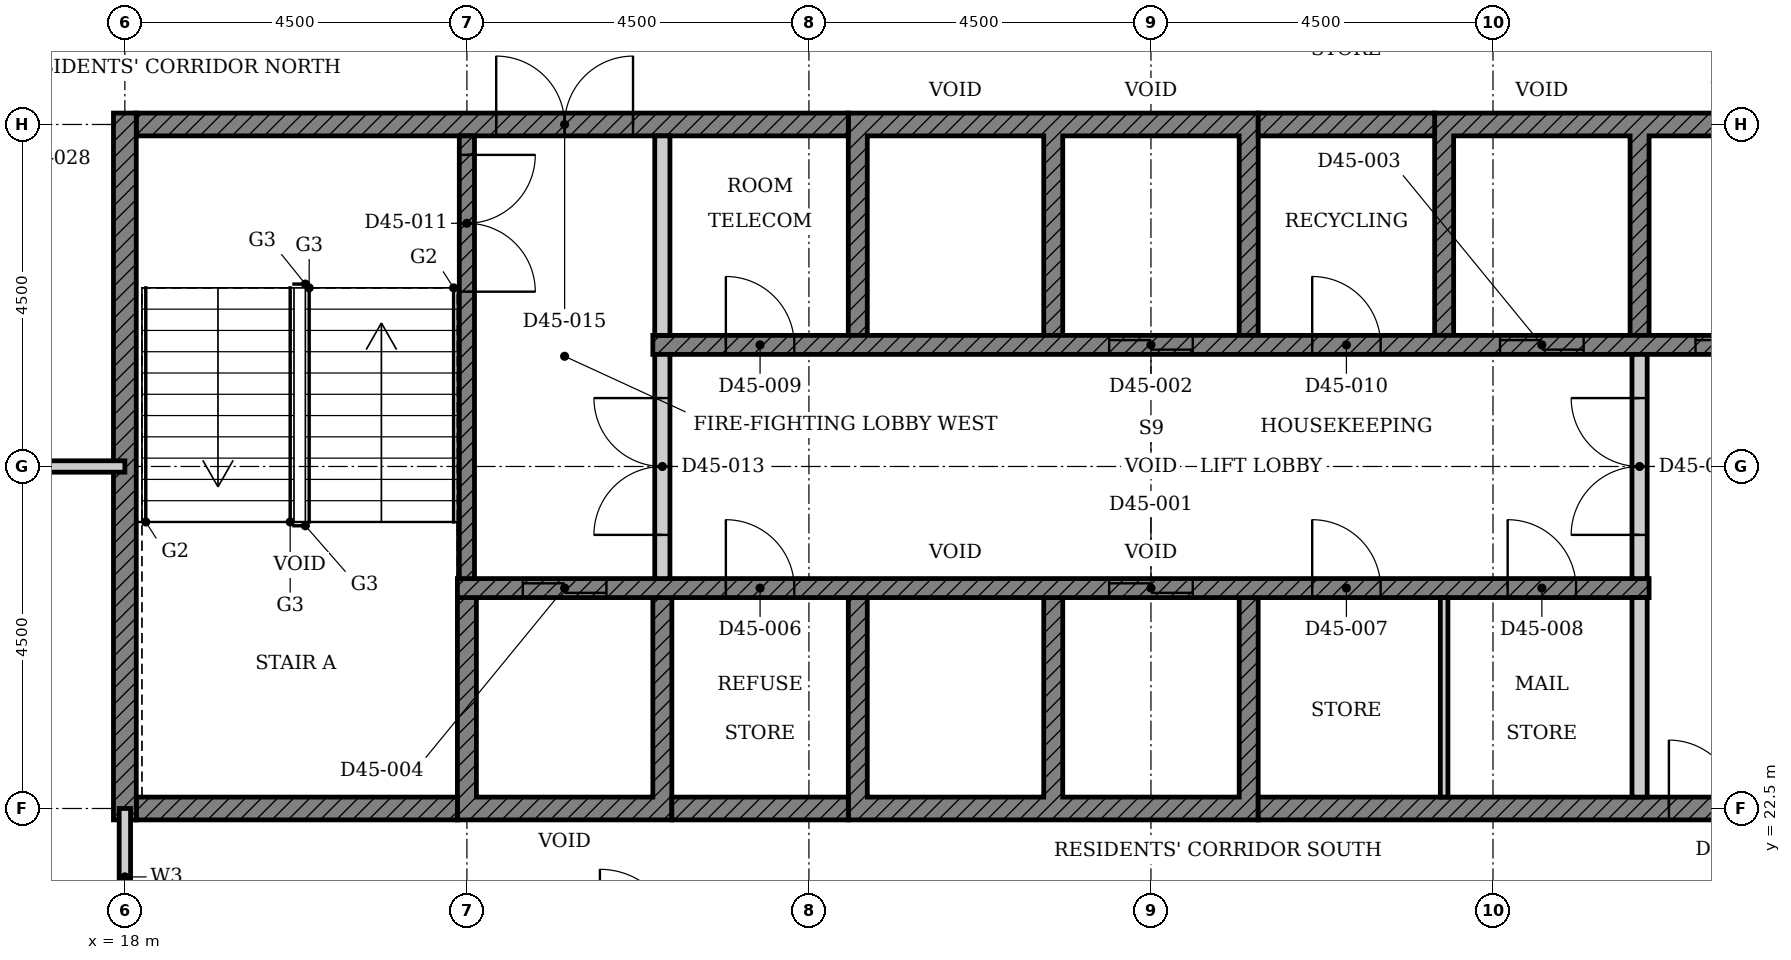
"""IFC4 building model, lengths in metres.
Left out: names, types, materials, properties, quantities, classifications, styles, units other than length and angle.
Written with IfcOpenShell. Run it as: python <this file> out.ifc"""

import sys

from ifc_helpers import new_model, si_unit, direction, frame, frame_2d, origin, place, context, subcontext, project, spatial, polyline, rectangle, outline, extrude, element, fill, save


model = new_model("IFC4")
c1 = context("Model", 3, precision=1e-05, world=origin(), true_north=direction((0.0, 1.0)))
c2 = subcontext(c1, "Body", "Model", "MODEL_VIEW")
j1 = project(units=[si_unit("LENGTHUNIT", "METRE"), si_unit("PLANEANGLEUNIT", "RADIAN")], contexts=[c1])
p1 = place(None, origin())
s1 = spatial("IfcSite", under=j1, at=p1, CompositionType="ELEMENT")
p2 = place(p1, origin())
s2 = spatial("IfcBuilding", under=s1, at=p2, CompositionType="ELEMENT")
p3 = place(p2, frame((0.0, 0.0, 180.2)))
s3 = spatial("IfcBuildingStorey", under=s2, at=p3, CompositionType="ELEMENT", Elevation=180.2)
p4 = place(p3, origin())
e1 = element("IfcWall", 1, at=p4, inside=s3, PredefinedType="SHEAR", context=c2, shape_type="SweptSolid", body=[
    extrude(outline(polyline([(22.375, 22.35), (25.197, 22.35), (25.197, 25.275), (24.947, 25.275), (24.947, 22.65), (22.625, 22.65), (22.625, 25.275), (22.375, 25.275), (22.375, 22.35)])), origin(), (0.0, 0.0, 1.0), 3.4),
])
p5 = place(p3, origin())
e2 = element("IfcWall", 2, at=p5, inside=s3, PredefinedType="SHEAR", context=c2, shape_type="SweptSolid", body=[
    extrude(outline(polyline([(27.518, 22.35), (32.911, 22.35), (32.911, 25.275), (32.661, 25.275), (32.661, 22.65), (30.339, 22.65), (30.339, 25.275), (30.089, 25.275), (30.089, 22.65), (27.768, 22.65), (27.768, 25.275), (27.518, 25.275), (27.518, 22.35)])), origin(), (0.0, 0.0, 1.0), 3.4),
])
p6 = place(p3, origin())
e3 = element("IfcWall", 3, at=p6, inside=s3, PredefinedType="SHEAR", context=c2, shape_type="SweptSolid", body=[
    extrude(outline(polyline([(27.518, 28.725), (27.768, 28.725), (27.768, 31.35), (30.089, 31.35), (30.089, 28.725), (30.339, 28.725), (30.339, 31.35), (32.661, 31.35), (32.661, 28.725), (32.911, 28.725), (32.911, 31.65), (27.518, 31.65), (27.518, 28.725)])), origin(), (0.0, 0.0, 1.0), 3.4),
])
p7 = place(p3, origin())
e4 = element("IfcWall", 4, at=p7, inside=s3, PredefinedType="SHEAR", context=c2, shape_type="SweptSolid", body=[
    extrude(outline(polyline([(35.232, 28.725), (35.482, 28.725), (35.482, 31.35), (37.803, 31.35), (37.803, 28.725), (38.053, 28.725), (38.053, 31.35), (40.375, 31.35), (40.375, 28.725), (40.625, 28.725), (40.625, 31.65), (35.232, 31.65), (35.232, 28.725)])), origin(), (0.0, 0.0, 1.0), 3.4),
])
p8 = place(p3, frame((18.15, 22.5, 0.0), z_axis=(0.0, 0.0, 1.0), x_axis=(1.0, 0.0, 0.0)))
e5 = element("IfcWall", 5, at=p8, inside=s3, PredefinedType="SHEAR", context=c2, shape_type="SweptSolid", body=[
    extrude(rectangle(XDim=4.225, YDim=0.3, at=frame_2d((2.113, 0.0))), origin(), (0.0, 0.0, 1.0), 3.4),
])
p9 = place(p3, frame((25.197, 22.5, 0.0), z_axis=(0.0, 0.0, 1.0), x_axis=(1.0, 0.0, 0.0)))
e6 = element("IfcWall", 6, at=p9, inside=s3, PredefinedType="SHEAR", context=c2, shape_type="SweptSolid", body=[
    extrude(rectangle(XDim=2.321, YDim=0.3, at=frame_2d((1.161, 0.0))), origin(), (0.0, 0.0, 1.0), 3.4),
])
p10 = place(p3, frame((32.911, 22.5, 0.0), z_axis=(0.0, 0.0, 1.0), x_axis=(1.0, 0.0, 0.0)))
e7 = element("IfcWall", 7, at=p10, inside=s3, PredefinedType="SHEAR", context=c2, shape_type="SweptSolid", body=[
    extrude(rectangle(XDim=11.939, YDim=0.3, at=frame_2d((5.97, 0.0))), origin(), (0.0, 0.0, 1.0), 3.4),
])
p11 = place(p10, frame((5.404, 0.0, 0.0)))
e8 = element("IfcOpeningElement", 8, at=p11, cuts=e7, PredefinedType="OPENING", context=c2, shape_type="SweptSolid", body=[
    extrude(rectangle(XDim=1.8, YDim=2.1, at=frame_2d((0.9, 1.05))), frame((0.0, 0.16, 0.0), z_axis=(0.0, -1.0, 0.0), x_axis=(1.0, 0.0, 0.0)), (0.0, 0.0, 1.0), 0.32),
])
p12 = place(p3, frame((18.15, 31.5, 0.0), z_axis=(0.0, 0.0, 1.0), x_axis=(1.0, 0.0, 0.0)))
e9 = element("IfcWall", 9, at=p12, inside=s3, PredefinedType="SHEAR", context=c2, shape_type="SweptSolid", body=[
    extrude(rectangle(XDim=9.368, YDim=0.3, at=frame_2d((4.684, 0.0))), origin(), (0.0, 0.0, 1.0), 3.4),
])
p13 = place(p12, frame((4.736, 0.0, 0.0)))
e10 = element("IfcOpeningElement", 10, at=p13, cuts=e9, PredefinedType="OPENING", context=c2, shape_type="SweptSolid", body=[
    extrude(rectangle(XDim=1.8, YDim=2.1, at=frame_2d((0.9, 1.05))), frame((0.0, 0.16, 0.0), z_axis=(0.0, -1.0, 0.0), x_axis=(1.0, 0.0, 0.0)), (0.0, 0.0, 1.0), 0.32),
])
p14 = place(p3, frame((32.911, 31.5, 0.0), z_axis=(0.0, 0.0, 1.0), x_axis=(1.0, 0.0, 0.0)))
e11 = element("IfcWall", 11, at=p14, inside=s3, PredefinedType="SHEAR", context=c2, shape_type="SweptSolid", body=[
    extrude(rectangle(XDim=2.322, YDim=0.3, at=frame_2d((1.161, 0.0))), origin(), (0.0, 0.0, 1.0), 3.4),
])
p15 = place(p3, frame((18.0, 22.35, 0.0), z_axis=(0.0, 0.0, 1.0), x_axis=(0.0, 1.0, 0.0)))
e12 = element("IfcWall", 12, at=p15, inside=s3, PredefinedType="SHEAR", context=c2, shape_type="SweptSolid", body=[
    extrude(rectangle(XDim=9.3, YDim=0.3, at=frame_2d((4.65, 0.0))), origin(), (0.0, 0.0, 1.0), 3.4),
])
p16 = place(p3, frame((22.375, 25.4, 0.0), z_axis=(0.0, 0.0, 1.0), x_axis=(1.0, 0.0, 0.0)))
e13 = element("IfcWall", 13, at=p16, inside=s3, PredefinedType="SHEAR", context=c2, shape_type="SweptSolid", body=[
    extrude(rectangle(XDim=15.678, YDim=0.25, at=frame_2d((7.839, 0.0))), origin(), (0.0, 0.0, 1.0), 3.4),
])
p17 = place(p16, frame((8.575, 0.0, 0.0)))
e14 = element("IfcOpeningElement", 14, at=p17, cuts=e13, PredefinedType="OPENING", context=c2, shape_type="SweptSolid", body=[
    extrude(rectangle(XDim=1.1, YDim=2.1, at=frame_2d((0.55, 1.05))), frame((0.0, 0.135, 0.0), z_axis=(0.0, -1.0, 0.0), x_axis=(1.0, 0.0, 0.0)), (0.0, 0.0, 1.0), 0.27),
])
p18 = place(p16, frame((0.861, 0.0, 0.0)))
e15 = element("IfcOpeningElement", 15, at=p18, cuts=e13, PredefinedType="OPENING", context=c2, shape_type="SweptSolid", body=[
    extrude(rectangle(XDim=1.1, YDim=2.1, at=frame_2d((0.55, 1.05))), frame((0.0, 0.135, 0.0), z_axis=(0.0, -1.0, 0.0), x_axis=(1.0, 0.0, 0.0)), (0.0, 0.0, 1.0), 0.27),
])
p19 = place(p16, frame((3.532, 0.0, 0.0)))
e16 = element("IfcOpeningElement", 16, at=p19, cuts=e13, PredefinedType="OPENING", context=c2, shape_type="SweptSolid", body=[
    extrude(rectangle(XDim=0.9, YDim=2.1, at=frame_2d((0.45, 1.05))), frame((0.0, 0.135, 0.0), z_axis=(0.0, -1.0, 0.0), x_axis=(1.0, 0.0, 0.0)), (0.0, 0.0, 1.0), 0.27),
])
p20 = place(p16, frame((11.246, 0.0, 0.0)))
e17 = element("IfcOpeningElement", 17, at=p20, cuts=e13, PredefinedType="OPENING", context=c2, shape_type="SweptSolid", body=[
    extrude(rectangle(XDim=0.9, YDim=2.1, at=frame_2d((0.45, 1.05))), frame((0.0, 0.135, 0.0), z_axis=(0.0, -1.0, 0.0), x_axis=(1.0, 0.0, 0.0)), (0.0, 0.0, 1.0), 0.27),
])
p21 = place(p16, frame((13.818, 0.0, 0.0)))
e18 = element("IfcOpeningElement", 18, at=p21, cuts=e13, PredefinedType="OPENING", context=c2, shape_type="SweptSolid", body=[
    extrude(rectangle(XDim=0.9, YDim=2.1, at=frame_2d((0.45, 1.05))), frame((0.0, 0.135, 0.0), z_axis=(0.0, -1.0, 0.0), x_axis=(1.0, 0.0, 0.0)), (0.0, 0.0, 1.0), 0.27),
])
p22 = place(p3, frame((24.947, 28.6, 0.0), z_axis=(0.0, 0.0, 1.0), x_axis=(1.0, 0.0, 0.0)))
e19 = element("IfcWall", 19, at=p22, inside=s3, PredefinedType="SHEAR", context=c2, shape_type="SweptSolid", body=[
    extrude(rectangle(XDim=15.678, YDim=0.25, at=frame_2d((7.839, 0.0))), origin(), (0.0, 0.0, 1.0), 3.4),
])
p23 = place(p22, frame((6.004, 0.0, 0.0)))
e20 = element("IfcOpeningElement", 20, at=p23, cuts=e19, PredefinedType="OPENING", context=c2, shape_type="SweptSolid", body=[
    extrude(rectangle(XDim=1.1, YDim=2.1, at=frame_2d((0.55, 1.05))), frame((0.0, 0.135, 0.0), z_axis=(0.0, -1.0, 0.0), x_axis=(1.0, 0.0, 0.0)), (0.0, 0.0, 1.0), 0.27),
])
p24 = place(p22, frame((11.146, 0.0, 0.0)))
e21 = element("IfcOpeningElement", 21, at=p24, cuts=e19, PredefinedType="OPENING", context=c2, shape_type="SweptSolid", body=[
    extrude(rectangle(XDim=1.1, YDim=2.1, at=frame_2d((0.55, 1.05))), frame((0.0, 0.135, 0.0), z_axis=(0.0, -1.0, 0.0), x_axis=(1.0, 0.0, 0.0)), (0.0, 0.0, 1.0), 0.27),
])
p25 = place(p22, frame((13.718, 0.0, 0.0)))
e22 = element("IfcOpeningElement", 22, at=p25, cuts=e19, PredefinedType="OPENING", context=c2, shape_type="SweptSolid", body=[
    extrude(rectangle(XDim=1.1, YDim=2.1, at=frame_2d((0.55, 1.05))), frame((0.0, 0.135, 0.0), z_axis=(0.0, -1.0, 0.0), x_axis=(1.0, 0.0, 0.0)), (0.0, 0.0, 1.0), 0.27),
])
p26 = place(p22, frame((0.961, 0.0, 0.0)))
e23 = element("IfcOpeningElement", 23, at=p26, cuts=e19, PredefinedType="OPENING", context=c2, shape_type="SweptSolid", body=[
    extrude(rectangle(XDim=0.9, YDim=2.1, at=frame_2d((0.45, 1.05))), frame((0.0, 0.135, 0.0), z_axis=(0.0, -1.0, 0.0), x_axis=(1.0, 0.0, 0.0)), (0.0, 0.0, 1.0), 0.27),
])
p27 = place(p22, frame((8.675, 0.0, 0.0)))
e24 = element("IfcOpeningElement", 24, at=p27, cuts=e19, PredefinedType="OPENING", context=c2, shape_type="SweptSolid", body=[
    extrude(rectangle(XDim=0.9, YDim=2.1, at=frame_2d((0.45, 1.05))), frame((0.0, 0.135, 0.0), z_axis=(0.0, -1.0, 0.0), x_axis=(1.0, 0.0, 0.0)), (0.0, 0.0, 1.0), 0.27),
])
p28 = place(p3, frame((37.928, 22.65, 0.0), z_axis=(0.0, 0.0, 1.0), x_axis=(0.0, 1.0, 0.0)))
e25 = element("IfcWall", 25, at=p28, inside=s3, PredefinedType="PARTITIONING", context=c2, shape_type="SweptSolid", body=[
    extrude(rectangle(XDim=2.625, YDim=0.2, at=frame_2d((1.312, 0.0))), origin(), (0.0, 0.0, 1.0), 3.4),
])
p29 = place(p3, frame((35.357, 22.65, 0.0), z_axis=(0.0, 0.0, 1.0), x_axis=(0.0, 1.0, 0.0)))
e26 = element("IfcWall", 26, at=p29, inside=s3, PredefinedType="PARTITIONING", context=c2, shape_type="SweptSolid", body=[
    extrude(rectangle(XDim=2.625, YDim=0.1, at=frame_2d((1.312, 0.0))), origin(), (0.0, 0.0, 1.0), 3.4),
])
p30 = place(p3, frame((25.072, 28.725, 0.0), z_axis=(0.0, 0.0, 1.0), x_axis=(0.0, 1.0, 0.0)))
e27 = element("IfcWall", 27, at=p30, inside=s3, PredefinedType="PARTITIONING", context=c2, shape_type="SweptSolid", body=[
    extrude(rectangle(XDim=2.625, YDim=0.2, at=frame_2d((1.312, 0.0))), origin(), (0.0, 0.0, 1.0), 3.4),
])
p31 = place(p3, frame((22.5, 31.35, 0.0), z_axis=(0.0, 0.0, 1.0), x_axis=(0.0, -1.0, 0.0)))
e28 = element("IfcWall", 28, at=p31, inside=s3, PredefinedType="SHEAR", context=c2, shape_type="SweptSolid", body=[
    extrude(rectangle(XDim=5.825, YDim=0.2, at=frame_2d((2.913, 0.0))), origin(), (0.0, 0.0, 1.0), 3.4),
])
p32 = place(p31, frame((0.25, 0.0, 0.0)))
e29 = element("IfcOpeningElement", 29, at=p32, cuts=e28, PredefinedType="OPENING", context=c2, shape_type="SweptSolid", body=[
    extrude(rectangle(XDim=1.8, YDim=2.1, at=frame_2d((0.9, 1.05))), frame((0.0, 0.11, 0.0), z_axis=(0.0, -1.0, 0.0), x_axis=(1.0, 0.0, 0.0)), (0.0, 0.0, 1.0), 0.22),
])
p33 = place(p3, frame((25.072, 25.525, 0.0), z_axis=(0.0, 0.0, 1.0), x_axis=(0.0, 1.0, 0.0)))
e30 = element("IfcWall", 30, at=p33, inside=s3, PredefinedType="PARTITIONING", context=c2, shape_type="SweptSolid", body=[
    extrude(rectangle(XDim=2.95, YDim=0.2, at=frame_2d((1.475, 0.0))), origin(), (0.0, 0.0, 1.0), 3.4),
])
p34 = place(p33, frame((0.575, 0.0, 0.0)))
e31 = element("IfcOpeningElement", 31, at=p34, cuts=e30, PredefinedType="OPENING", context=c2, shape_type="SweptSolid", body=[
    extrude(rectangle(XDim=1.8, YDim=2.1, at=frame_2d((0.9, 1.05))), frame((0.0, 0.11, 0.0), z_axis=(0.0, -1.0, 0.0), x_axis=(1.0, 0.0, 0.0)), (0.0, 0.0, 1.0), 0.22),
])
p35 = place(p3, frame((37.928, 25.525, 0.0), z_axis=(0.0, 0.0, 1.0), x_axis=(0.0, 1.0, 0.0)))
e32 = element("IfcWall", 32, at=p35, inside=s3, PredefinedType="PARTITIONING", context=c2, shape_type="SweptSolid", body=[
    extrude(rectangle(XDim=2.95, YDim=0.2, at=frame_2d((1.475, 0.0))), origin(), (0.0, 0.0, 1.0), 3.4),
])
p36 = place(p35, frame((0.575, 0.0, 0.0)))
e33 = element("IfcOpeningElement", 33, at=p36, cuts=e32, PredefinedType="OPENING", context=c2, shape_type="SweptSolid", body=[
    extrude(rectangle(XDim=1.8, YDim=2.1, at=frame_2d((0.9, 1.05))), frame((0.0, 0.11, 0.0), z_axis=(0.0, -1.0, 0.0), x_axis=(1.0, 0.0, 0.0)), (0.0, 0.0, 1.0), 0.22),
])
p37 = place(p3, frame((4.5, 27.0, 0.0), z_axis=(0.0, 0.0, 1.0), x_axis=(1.0, 0.0, 0.0)))
e34 = element("IfcWall", 34, at=p37, inside=s3, PredefinedType="PARTITIONING", context=c2, shape_type="SweptSolid", body=[
    extrude(rectangle(XDim=13.5, YDim=0.15, at=frame_2d((6.75, 0.0))), origin(), (0.0, 0.0, 1.0), 2.68),
])
p38 = place(p37, frame((5.35, 0.0, 0.0)))
e35 = element("IfcOpeningElement", 35, at=p38, cuts=e34, PredefinedType="OPENING", context=c2, shape_type="SweptSolid", body=[
    extrude(rectangle(XDim=1.0, YDim=2.1, at=frame_2d((0.5, 1.05))), frame((0.0, 0.085, 0.0), z_axis=(0.0, -1.0, 0.0), x_axis=(1.0, 0.0, 0.0)), (0.0, 0.0, 1.0), 0.17),
])
p39 = place(p3, frame((18.0, 20.7, 0.0), z_axis=(0.0, 0.0, 1.0), x_axis=(0.0, 1.0, 0.0)))
e36 = element("IfcWall", 36, at=p39, inside=s3, PredefinedType="PARTITIONING", context=c2, shape_type="SweptSolid", body=[
    extrude(rectangle(XDim=1.8, YDim=0.15, at=frame_2d((0.9, 0.0))), origin(), (0.0, 0.0, 1.0), 3.4),
])
p40 = place(p17, origin())
e37 = element("IfcDoor", 37, at=p40, inside=s3, OperationType="DOUBLE_DOOR_SLIDING", PredefinedType="DOOR", context=c2, shape_type="SweptSolid", body=[
    extrude(rectangle(XDim=1.1, YDim=2.1, at=frame_2d((0.55, 1.05))), frame((0.0, 0.025, 0.0), z_axis=(0.0, -1.0, 0.0), x_axis=(1.0, 0.0, 0.0)), (0.0, 0.0, 1.0), 0.05),
])
fill(e14, e37)
p41 = place(p23, origin())
e38 = element("IfcDoor", 38, at=p41, inside=s3, OperationType="DOUBLE_DOOR_SLIDING", PredefinedType="DOOR", context=c2, shape_type="SweptSolid", body=[
    extrude(rectangle(XDim=1.1, YDim=2.1, at=frame_2d((0.55, 1.05))), frame((0.0, 0.025, 0.0), z_axis=(0.0, -1.0, 0.0), x_axis=(1.0, 0.0, 0.0)), (0.0, 0.0, 1.0), 0.05),
])
fill(e20, e38)
p42 = place(p24, origin())
e39 = element("IfcDoor", 39, at=p42, inside=s3, OperationType="DOUBLE_DOOR_SLIDING", PredefinedType="DOOR", context=c2, shape_type="SweptSolid", body=[
    extrude(rectangle(XDim=1.1, YDim=2.1, at=frame_2d((0.55, 1.05))), frame((0.0, 0.025, 0.0), z_axis=(0.0, -1.0, 0.0), x_axis=(1.0, 0.0, 0.0)), (0.0, 0.0, 1.0), 0.05),
])
fill(e21, e39)
p43 = place(p18, origin())
e40 = element("IfcDoor", 40, at=p43, inside=s3, OperationType="DOUBLE_DOOR_SLIDING", PredefinedType="DOOR", context=c2, shape_type="SweptSolid", body=[
    extrude(rectangle(XDim=1.1, YDim=2.1, at=frame_2d((0.55, 1.05))), frame((0.0, 0.025, 0.0), z_axis=(0.0, -1.0, 0.0), x_axis=(1.0, 0.0, 0.0)), (0.0, 0.0, 1.0), 0.05),
])
fill(e15, e40)
p44 = place(p25, origin())
e41 = element("IfcDoor", 41, at=p44, inside=s3, OperationType="DOUBLE_DOOR_SLIDING", PredefinedType="DOOR", context=c2, shape_type="SweptSolid", body=[
    extrude(rectangle(XDim=1.1, YDim=2.1, at=frame_2d((0.55, 1.05))), frame((0.0, 0.025, 0.0), z_axis=(0.0, -1.0, 0.0), x_axis=(1.0, 0.0, 0.0)), (0.0, 0.0, 1.0), 0.05),
])
fill(e22, e41)
p45 = place(p19, origin())
e42 = element("IfcDoor", 42, at=p45, inside=s3, OperationType="SINGLE_SWING_LEFT", PredefinedType="DOOR", context=c2, shape_type="SweptSolid", body=[
    extrude(rectangle(XDim=0.9, YDim=2.1, at=frame_2d((0.45, 1.05))), frame((0.0, 0.025, 0.0), z_axis=(0.0, -1.0, 0.0), x_axis=(1.0, 0.0, 0.0)), (0.0, 0.0, 1.0), 0.05),
])
fill(e16, e42)
p46 = place(p20, origin())
e43 = element("IfcDoor", 43, at=p46, inside=s3, OperationType="SINGLE_SWING_LEFT", PredefinedType="DOOR", context=c2, shape_type="SweptSolid", body=[
    extrude(rectangle(XDim=0.9, YDim=2.1, at=frame_2d((0.45, 1.05))), frame((0.0, 0.025, 0.0), z_axis=(0.0, -1.0, 0.0), x_axis=(1.0, 0.0, 0.0)), (0.0, 0.0, 1.0), 0.05),
])
fill(e17, e43)
p47 = place(p21, origin())
e44 = element("IfcDoor", 44, at=p47, inside=s3, OperationType="SINGLE_SWING_LEFT", PredefinedType="DOOR", context=c2, shape_type="SweptSolid", body=[
    extrude(rectangle(XDim=0.9, YDim=2.1, at=frame_2d((0.45, 1.05))), frame((0.0, 0.025, 0.0), z_axis=(0.0, -1.0, 0.0), x_axis=(1.0, 0.0, 0.0)), (0.0, 0.0, 1.0), 0.05),
])
fill(e18, e44)
p48 = place(p26, origin())
e45 = element("IfcDoor", 45, at=p48, inside=s3, OperationType="SINGLE_SWING_LEFT", PredefinedType="DOOR", context=c2, shape_type="SweptSolid", body=[
    extrude(rectangle(XDim=0.9, YDim=2.1, at=frame_2d((0.45, 1.05))), frame((0.0, 0.025, 0.0), z_axis=(0.0, -1.0, 0.0), x_axis=(1.0, 0.0, 0.0)), (0.0, 0.0, 1.0), 0.05),
])
fill(e23, e45)
p49 = place(p27, origin())
e46 = element("IfcDoor", 46, at=p49, inside=s3, OperationType="SINGLE_SWING_LEFT", PredefinedType="DOOR", context=c2, shape_type="SweptSolid", body=[
    extrude(rectangle(XDim=0.9, YDim=2.1, at=frame_2d((0.45, 1.05))), frame((0.0, 0.025, 0.0), z_axis=(0.0, -1.0, 0.0), x_axis=(1.0, 0.0, 0.0)), (0.0, 0.0, 1.0), 0.05),
])
fill(e24, e46)
p50 = place(p32, origin())
e47 = element("IfcDoor", 47, at=p50, inside=s3, OperationType="DOUBLE_DOOR_SINGLE_SWING", PredefinedType="DOOR", context=c2, shape_type="SweptSolid", body=[
    extrude(rectangle(XDim=1.8, YDim=2.1, at=frame_2d((0.9, 1.05))), frame((0.0, 0.025, 0.0), z_axis=(0.0, -1.0, 0.0), x_axis=(1.0, 0.0, 0.0)), (0.0, 0.0, 1.0), 0.05),
])
fill(e29, e47)
p51 = place(p34, origin())
e48 = element("IfcDoor", 48, at=p51, inside=s3, OperationType="DOUBLE_DOOR_SINGLE_SWING", PredefinedType="DOOR", context=c2, shape_type="SweptSolid", body=[
    extrude(rectangle(XDim=1.8, YDim=2.1, at=frame_2d((0.9, 1.05))), frame((0.0, 0.025, 0.0), z_axis=(0.0, -1.0, 0.0), x_axis=(1.0, 0.0, 0.0)), (0.0, 0.0, 1.0), 0.05),
])
fill(e31, e48)
p52 = place(p36, origin())
e49 = element("IfcDoor", 49, at=p52, inside=s3, OperationType="DOUBLE_DOOR_SINGLE_SWING", PredefinedType="DOOR", context=c2, shape_type="SweptSolid", body=[
    extrude(rectangle(XDim=1.8, YDim=2.1, at=frame_2d((0.9, 1.05))), frame((0.0, 0.025, 0.0), z_axis=(0.0, -1.0, 0.0), x_axis=(1.0, 0.0, 0.0)), (0.0, 0.0, 1.0), 0.05),
])
fill(e33, e49)
p53 = place(p13, origin())
e50 = element("IfcDoor", 50, at=p53, inside=s3, OperationType="DOUBLE_DOOR_SINGLE_SWING", PredefinedType="DOOR", context=c2, shape_type="SweptSolid", body=[
    extrude(rectangle(XDim=1.8, YDim=2.1, at=frame_2d((0.9, 1.05))), frame((0.0, 0.025, 0.0), z_axis=(0.0, -1.0, 0.0), x_axis=(1.0, 0.0, 0.0)), (0.0, 0.0, 1.0), 0.05),
])
fill(e10, e50)
p54 = place(p11, origin())
e51 = element("IfcDoor", 51, at=p54, inside=s3, OperationType="DOUBLE_DOOR_SINGLE_SWING", PredefinedType="DOOR", context=c2, shape_type="SweptSolid", body=[
    extrude(rectangle(XDim=1.8, YDim=2.1, at=frame_2d((0.9, 1.05))), frame((0.0, 0.025, 0.0), z_axis=(0.0, -1.0, 0.0), x_axis=(1.0, 0.0, 0.0)), (0.0, 0.0, 1.0), 0.05),
])
fill(e8, e51)
save(model, sys.argv[1])
